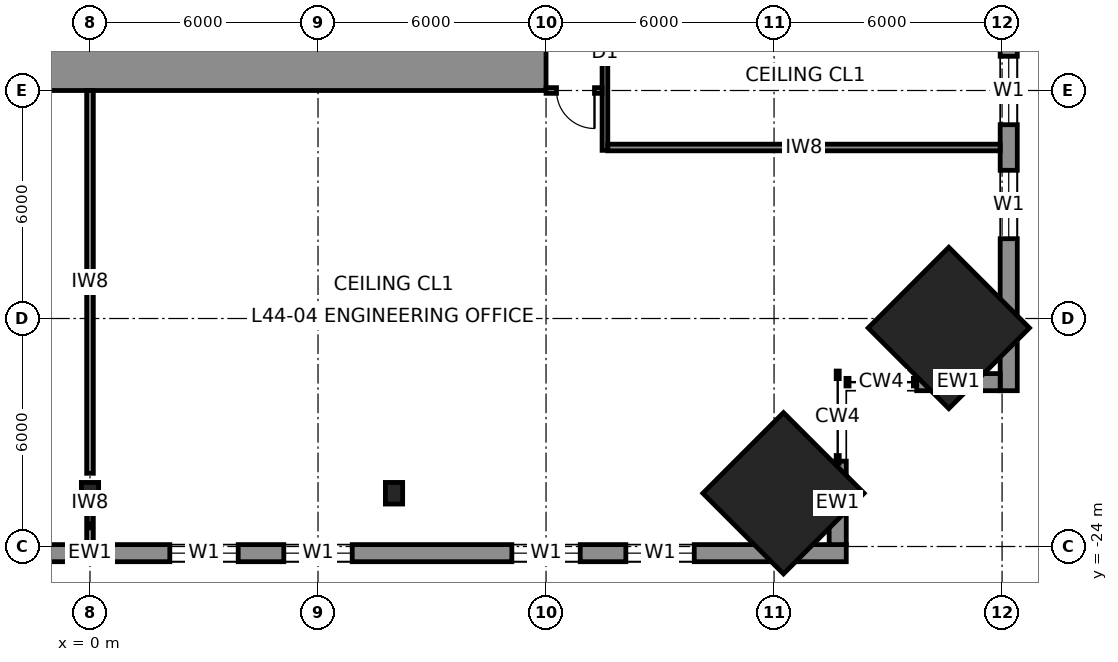
"""IFC4 building model, lengths in metres.
Left out: names, types, materials, properties, quantities, classifications, styles, units other than length and angle.
Written with IfcOpenShell. Run it as: python <this file> out.ifc"""

import sys

from ifc_helpers import new_model, si_unit, direction, frame, frame_2d, origin, origin_2d, place, context, subcontext, project, spatial, rectangle, i_section, extrude, element, fill, save


model = new_model("IFC4")
c1 = context("Model", 3, precision=1e-05, world=origin(), true_north=direction((0.0, 1.0)))
c2 = subcontext(c1, "Body", "Model", "MODEL_VIEW")
j1 = project(units=[si_unit("LENGTHUNIT", "METRE"), si_unit("PLANEANGLEUNIT", "RADIAN")], contexts=[c1])
p1 = place(None, origin())
s1 = spatial("IfcSite", under=j1, at=p1, CompositionType="ELEMENT")
p2 = place(p1, origin())
s2 = spatial("IfcBuilding", under=s1, at=p2, CompositionType="ELEMENT")
p3 = place(p2, frame((0.0, 0.0, 205.8)))
s3 = spatial("IfcBuildingStorey", under=s2, at=p3, CompositionType="ELEMENT", Elevation=205.8)
for number, where, z_axis, x_axis in (
    (1, (22.598, -18.248, 0.0), (-0.04, 0.04, 0.998), (-0.707, -0.708, 0.0)),
    (2, (18.248, -22.598, 0.0), (-0.04, 0.04, 0.998), (-0.708, -0.707, 0.0)),
):
    element("IfcColumn", number, at=place(p3, frame(where, z_axis=z_axis, x_axis=x_axis)), inside=s3, PredefinedType="COLUMN", context=c2, shape_type="SweptSolid", body=[
        extrude(rectangle(XDim=3.0, YDim=3.0, at=origin_2d()), origin(), (0.0, 0.0, 1.0), 4.007),
    ])
for number, where, z_axis, x_axis in (
    (3, (0.0, -22.598, 0.0), (0.0, 0.04, 0.999), (-1.0, 0.0, 0.0)),
    (4, (8.0, -22.598, 0.0), (0.0, 0.04, 0.999), (-1.0, 0.0, 0.0)),
):
    element("IfcColumn", number, at=place(p3, frame(where, z_axis=z_axis, x_axis=x_axis)), inside=s3, PredefinedType="COLUMN", context=c2, shape_type="SweptSolid", body=[
        extrude(i_section(OverallWidth=0.454, OverallDepth=0.569, WebThickness=0.078, FlangeThickness=0.125, at=origin_2d()), origin(), (0.0, 0.0, 1.0), 4.003),
    ])
p4 = place(p3, frame((12.0, -11.25, 0.0), z_axis=(0.0, 0.0, 1.0), x_axis=(-1.0, 0.0, 0.0)))
e5 = element("IfcWall", 5, at=p4, inside=s3, PredefinedType="SHEAR", context=c2, shape_type="SweptSolid", body=[
    extrude(rectangle(XDim=24.0, YDim=1.5, at=frame_2d((12.0, 0.0))), origin(), (0.0, 0.0, 1.0), 4.0),
])
p5 = place(p3, frame((24.175, -19.9, 0.0), z_axis=(0.0, 0.0, 1.0), x_axis=(0.0, 1.0, 0.0)))
e6 = element("IfcWall", 6, at=p5, inside=s3, PredefinedType="SOLIDWALL", context=c2, shape_type="SweptSolid", body=[
    extrude(rectangle(XDim=39.8, YDim=0.45, at=frame_2d((19.9, 0.0))), origin(), (0.0, 0.0, 1.0), 3.83),
])
p6 = place(p5, frame((4.0, 0.0, 0.7)))
e7 = element("IfcOpeningElement", 7, at=p6, cuts=e6, PredefinedType="OPENING", context=c2, shape_type="SweptSolid", body=[
    extrude(rectangle(XDim=1.8, YDim=2.6, at=frame_2d((0.9, 1.3))), frame((0.0, 0.235, 0.0), z_axis=(0.0, -1.0, 0.0), x_axis=(1.0, 0.0, 0.0)), (0.0, 0.0, 1.0), 0.47),
])
p7 = place(p5, frame((7.0, 0.0, 0.7)))
e8 = element("IfcOpeningElement", 8, at=p7, cuts=e6, PredefinedType="OPENING", context=c2, shape_type="SweptSolid", body=[
    extrude(rectangle(XDim=1.8, YDim=2.6, at=frame_2d((0.9, 1.3))), frame((0.0, 0.235, 0.0), z_axis=(0.0, -1.0, 0.0), x_axis=(1.0, 0.0, 0.0)), (0.0, 0.0, 1.0), 0.47),
])
p8 = place(p5, frame((13.0, 0.0, 0.7)))
e9 = element("IfcOpeningElement", 9, at=p8, cuts=e6, PredefinedType="OPENING", context=c2, shape_type="SweptSolid", body=[
    extrude(rectangle(XDim=1.8, YDim=2.6, at=frame_2d((0.9, 1.3))), frame((0.0, 0.235, 0.0), z_axis=(0.0, -1.0, 0.0), x_axis=(1.0, 0.0, 0.0)), (0.0, 0.0, 1.0), 0.47),
])
p9 = place(p5, frame((16.0, 0.0, 0.7)))
e10 = element("IfcOpeningElement", 10, at=p9, cuts=e6, PredefinedType="OPENING", context=c2, shape_type="SweptSolid", body=[
    extrude(rectangle(XDim=1.8, YDim=2.6, at=frame_2d((0.9, 1.3))), frame((0.0, 0.235, 0.0), z_axis=(0.0, -1.0, 0.0), x_axis=(1.0, 0.0, 0.0)), (0.0, 0.0, 1.0), 0.47),
])
p10 = place(p5, frame((22.0, 0.0, 0.7)))
e11 = element("IfcOpeningElement", 11, at=p10, cuts=e6, PredefinedType="OPENING", context=c2, shape_type="SweptSolid", body=[
    extrude(rectangle(XDim=1.8, YDim=2.6, at=frame_2d((0.9, 1.3))), frame((0.0, 0.235, 0.0), z_axis=(0.0, -1.0, 0.0), x_axis=(1.0, 0.0, 0.0)), (0.0, 0.0, 1.0), 0.47),
])
p11 = place(p5, frame((25.0, 0.0, 0.7)))
e12 = element("IfcOpeningElement", 12, at=p11, cuts=e6, PredefinedType="OPENING", context=c2, shape_type="SweptSolid", body=[
    extrude(rectangle(XDim=1.8, YDim=2.6, at=frame_2d((0.9, 1.3))), frame((0.0, 0.235, 0.0), z_axis=(0.0, -1.0, 0.0), x_axis=(1.0, 0.0, 0.0)), (0.0, 0.0, 1.0), 0.47),
])
p12 = place(p5, frame((31.0, 0.0, 0.7)))
e13 = element("IfcOpeningElement", 13, at=p12, cuts=e6, PredefinedType="OPENING", context=c2, shape_type="SweptSolid", body=[
    extrude(rectangle(XDim=1.8, YDim=2.6, at=frame_2d((0.9, 1.3))), frame((0.0, 0.235, 0.0), z_axis=(0.0, -1.0, 0.0), x_axis=(1.0, 0.0, 0.0)), (0.0, 0.0, 1.0), 0.47),
])
p13 = place(p5, frame((34.0, 0.0, 0.7)))
e14 = element("IfcOpeningElement", 14, at=p13, cuts=e6, PredefinedType="OPENING", context=c2, shape_type="SweptSolid", body=[
    extrude(rectangle(XDim=1.8, YDim=2.6, at=frame_2d((0.9, 1.3))), frame((0.0, 0.235, 0.0), z_axis=(0.0, -1.0, 0.0), x_axis=(1.0, 0.0, 0.0)), (0.0, 0.0, 1.0), 0.47),
])
p14 = place(p3, frame((-19.9, -24.175, 0.0), z_axis=(0.0, 0.0, 1.0), x_axis=(1.0, 0.0, 0.0)))
e15 = element("IfcWall", 15, at=p14, inside=s3, PredefinedType="SOLIDWALL", context=c2, shape_type="SweptSolid", body=[
    extrude(rectangle(XDim=39.8, YDim=0.45, at=frame_2d((19.9, 0.0))), origin(), (0.0, 0.0, 1.0), 3.83),
])
p15 = place(p14, frame((4.0, 0.0, 0.7)))
e16 = element("IfcOpeningElement", 16, at=p15, cuts=e15, PredefinedType="OPENING", context=c2, shape_type="SweptSolid", body=[
    extrude(rectangle(XDim=1.8, YDim=2.6, at=frame_2d((0.9, 1.3))), frame((0.0, 0.235, 0.0), z_axis=(0.0, -1.0, 0.0), x_axis=(1.0, 0.0, 0.0)), (0.0, 0.0, 1.0), 0.47),
])
p16 = place(p14, frame((7.0, 0.0, 0.7)))
e17 = element("IfcOpeningElement", 17, at=p16, cuts=e15, PredefinedType="OPENING", context=c2, shape_type="SweptSolid", body=[
    extrude(rectangle(XDim=1.8, YDim=2.6, at=frame_2d((0.9, 1.3))), frame((0.0, 0.235, 0.0), z_axis=(0.0, -1.0, 0.0), x_axis=(1.0, 0.0, 0.0)), (0.0, 0.0, 1.0), 0.47),
])
p17 = place(p14, frame((13.0, 0.0, 0.7)))
e18 = element("IfcOpeningElement", 18, at=p17, cuts=e15, PredefinedType="OPENING", context=c2, shape_type="SweptSolid", body=[
    extrude(rectangle(XDim=1.8, YDim=2.6, at=frame_2d((0.9, 1.3))), frame((0.0, 0.235, 0.0), z_axis=(0.0, -1.0, 0.0), x_axis=(1.0, 0.0, 0.0)), (0.0, 0.0, 1.0), 0.47),
])
p18 = place(p14, frame((16.0, 0.0, 0.7)))
e19 = element("IfcOpeningElement", 19, at=p18, cuts=e15, PredefinedType="OPENING", context=c2, shape_type="SweptSolid", body=[
    extrude(rectangle(XDim=1.8, YDim=2.6, at=frame_2d((0.9, 1.3))), frame((0.0, 0.235, 0.0), z_axis=(0.0, -1.0, 0.0), x_axis=(1.0, 0.0, 0.0)), (0.0, 0.0, 1.0), 0.47),
])
p19 = place(p14, frame((22.0, 0.0, 0.7)))
e20 = element("IfcOpeningElement", 20, at=p19, cuts=e15, PredefinedType="OPENING", context=c2, shape_type="SweptSolid", body=[
    extrude(rectangle(XDim=1.8, YDim=2.6, at=frame_2d((0.9, 1.3))), frame((0.0, 0.235, 0.0), z_axis=(0.0, -1.0, 0.0), x_axis=(1.0, 0.0, 0.0)), (0.0, 0.0, 1.0), 0.47),
])
p20 = place(p14, frame((25.0, 0.0, 0.7)))
e21 = element("IfcOpeningElement", 21, at=p20, cuts=e15, PredefinedType="OPENING", context=c2, shape_type="SweptSolid", body=[
    extrude(rectangle(XDim=1.8, YDim=2.6, at=frame_2d((0.9, 1.3))), frame((0.0, 0.235, 0.0), z_axis=(0.0, -1.0, 0.0), x_axis=(1.0, 0.0, 0.0)), (0.0, 0.0, 1.0), 0.47),
])
p21 = place(p14, frame((31.0, 0.0, 0.7)))
e22 = element("IfcOpeningElement", 22, at=p21, cuts=e15, PredefinedType="OPENING", context=c2, shape_type="SweptSolid", body=[
    extrude(rectangle(XDim=1.8, YDim=2.6, at=frame_2d((0.9, 1.3))), frame((0.0, 0.235, 0.0), z_axis=(0.0, -1.0, 0.0), x_axis=(1.0, 0.0, 0.0)), (0.0, 0.0, 1.0), 0.47),
])
p22 = place(p14, frame((34.0, 0.0, 0.7)))
e23 = element("IfcOpeningElement", 23, at=p22, cuts=e15, PredefinedType="OPENING", context=c2, shape_type="SweptSolid", body=[
    extrude(rectangle(XDim=1.8, YDim=2.6, at=frame_2d((0.9, 1.3))), frame((0.0, 0.235, 0.0), z_axis=(0.0, -1.0, 0.0), x_axis=(1.0, 0.0, 0.0)), (0.0, 0.0, 1.0), 0.47),
])
for number, where, z_axis, x_axis in (
    (24, (19.675, -21.754, 0.0), (0.0, 0.0, 1.0), (0.0, -1.0, 0.0)),
    (25, (21.754, -19.675, 0.0), (0.0, 0.0, 1.0), (1.0, 0.0, 0.0)),
):
    element("IfcWall", number, at=place(p3, frame(where, z_axis=z_axis, x_axis=x_axis)), inside=s3, PredefinedType="SOLIDWALL", context=c2, shape_type="SweptSolid", body=[
        extrude(rectangle(XDim=2.196, YDim=0.45, at=frame_2d((1.098, 0.0))), origin(), (0.0, 0.0, 1.0), 3.83),
    ])
p23 = place(p3, frame((13.55, -13.575, 0.0), z_axis=(0.0, 0.0, 1.0), x_axis=(0.0, 1.0, 0.0)))
e26 = element("IfcWall", 26, at=p23, inside=s3, PredefinedType="PARTITIONING", context=c2, shape_type="SweptSolid", body=[
    extrude(rectangle(XDim=27.15, YDim=0.15, at=frame_2d((13.575, 0.0))), origin(), (0.0, 0.0, 1.0), 3.83),
])
p24 = place(p23, frame((3.175, 0.0, 0.0)))
e27 = element("IfcOpeningElement", 27, at=p24, cuts=e26, PredefinedType="OPENING", context=c2, shape_type="SweptSolid", body=[
    extrude(rectangle(XDim=1.0, YDim=2.3, at=frame_2d((0.5, 1.15))), frame((0.0, 0.085, 0.0), z_axis=(0.0, -1.0, 0.0), x_axis=(1.0, 0.0, 0.0)), (0.0, 0.0, 1.0), 0.17),
])
p25 = place(p23, frame((13.325, 0.0, 0.0)))
e28 = element("IfcOpeningElement", 28, at=p25, cuts=e26, PredefinedType="OPENING", context=c2, shape_type="SweptSolid", body=[
    extrude(rectangle(XDim=1.0, YDim=2.3, at=frame_2d((0.5, 1.15))), frame((0.0, 0.085, 0.0), z_axis=(0.0, -1.0, 0.0), x_axis=(1.0, 0.0, 0.0)), (0.0, 0.0, 1.0), 0.17),
])
p26 = place(p23, frame((22.975, 0.0, 0.0)))
e29 = element("IfcOpeningElement", 29, at=p26, cuts=e26, PredefinedType="OPENING", context=c2, shape_type="SweptSolid", body=[
    extrude(rectangle(XDim=1.0, YDim=2.3, at=frame_2d((0.5, 1.15))), frame((0.0, 0.085, 0.0), z_axis=(0.0, -1.0, 0.0), x_axis=(1.0, 0.0, 0.0)), (0.0, 0.0, 1.0), 0.17),
])
p27 = place(p23, frame((9.325, 0.0, 0.0)))
e30 = element("IfcOpeningElement", 30, at=p27, cuts=e26, PredefinedType="OPENING", context=c2, shape_type="SweptSolid", body=[
    extrude(rectangle(XDim=1.0, YDim=2.3, at=frame_2d((0.5, 1.15))), frame((0.0, 0.085, 0.0), z_axis=(0.0, -1.0, 0.0), x_axis=(1.0, 0.0, 0.0)), (0.0, 0.0, 1.0), 0.17),
])
p28 = place(p23, frame((16.825, 0.0, 0.0)))
e31 = element("IfcOpeningElement", 31, at=p28, cuts=e26, PredefinedType="OPENING", context=c2, shape_type="SweptSolid", body=[
    extrude(rectangle(XDim=1.0, YDim=2.3, at=frame_2d((0.5, 1.15))), frame((0.0, 0.085, 0.0), z_axis=(0.0, -1.0, 0.0), x_axis=(1.0, 0.0, 0.0)), (0.0, 0.0, 1.0), 0.17),
])
p29 = place(p3, frame((13.475, -12.0, 0.0), z_axis=(0.0, 0.0, 1.0), x_axis=(-1.0, 0.0, 0.0)))
e32 = element("IfcWall", 32, at=p29, inside=s3, PredefinedType="PARTITIONING", context=c2, shape_type="SweptSolid", body=[
    extrude(rectangle(XDim=1.475, YDim=0.15, at=frame_2d((0.738, 0.0))), origin(), (0.0, 0.0, 1.0), 3.83),
])
p30 = place(p29, frame((0.2, 0.0, 0.0)))
e33 = element("IfcOpeningElement", 33, at=p30, cuts=e32, PredefinedType="OPENING", context=c2, shape_type="SweptSolid", body=[
    extrude(rectangle(XDim=1.0, YDim=2.3, at=frame_2d((0.5, 1.15))), frame((0.0, 0.085, 0.0), z_axis=(0.0, -1.0, 0.0), x_axis=(1.0, 0.0, 0.0)), (0.0, 0.0, 1.0), 0.17),
])
p31 = place(p3, frame((23.95, -13.5, 0.0), z_axis=(0.0, 0.0, 1.0), x_axis=(-1.0, 0.0, 0.0)))
e34 = element("IfcWall", 34, at=p31, inside=s3, PredefinedType="PARTITIONING", context=c2, shape_type="SweptSolid", body=[
    extrude(rectangle(XDim=10.325, YDim=0.175, at=frame_2d((5.163, 0.0))), origin(), (0.0, 0.0, 1.0), 3.83),
])
p32 = place(p3, frame((0.0, -12.0, 0.0), z_axis=(0.0, 0.0, 1.0), x_axis=(0.0, -1.0, 0.0)))
e35 = element("IfcWall", 35, at=p32, inside=s3, PredefinedType="PARTITIONING", context=c2, shape_type="SweptSolid", body=[
    extrude(rectangle(XDim=10.073, YDim=0.175, at=frame_2d((5.037, 0.0))), origin(), (0.0, 0.0, 1.0), 3.04),
])
p33 = place(p3, frame((0.0, -22.962, 0.0), z_axis=(0.0, 0.0, 1.0), x_axis=(0.0, -1.0, 0.0)))
e36 = element("IfcWall", 36, at=p33, inside=s3, PredefinedType="PARTITIONING", context=c2, shape_type="SweptSolid", body=[
    extrude(rectangle(XDim=0.988, YDim=0.175, at=frame_2d((0.494, 0.0))), origin(), (0.0, 0.0, 1.0), 3.83),
])
p34 = place(p6, origin())
e37 = element("IfcWindow", 37, at=p34, inside=s3, PartitioningType="SINGLE_PANEL", PredefinedType="WINDOW", context=c2, shape_type="SweptSolid", body=[
    extrude(rectangle(XDim=1.8, YDim=2.6, at=frame_2d((0.9, 1.3))), frame((0.0, 0.03, 0.0), z_axis=(0.0, -1.0, 0.0), x_axis=(1.0, 0.0, 0.0)), (0.0, 0.0, 1.0), 0.06),
])
fill(e7, e37)
p35 = place(p7, origin())
e38 = element("IfcWindow", 38, at=p35, inside=s3, PartitioningType="SINGLE_PANEL", PredefinedType="WINDOW", context=c2, shape_type="SweptSolid", body=[
    extrude(rectangle(XDim=1.8, YDim=2.6, at=frame_2d((0.9, 1.3))), frame((0.0, 0.03, 0.0), z_axis=(0.0, -1.0, 0.0), x_axis=(1.0, 0.0, 0.0)), (0.0, 0.0, 1.0), 0.06),
])
fill(e8, e38)
p36 = place(p19, origin())
e39 = element("IfcWindow", 39, at=p36, inside=s3, PartitioningType="SINGLE_PANEL", PredefinedType="WINDOW", context=c2, shape_type="SweptSolid", body=[
    extrude(rectangle(XDim=1.8, YDim=2.6, at=frame_2d((0.9, 1.3))), frame((0.0, 0.03, 0.0), z_axis=(0.0, -1.0, 0.0), x_axis=(1.0, 0.0, 0.0)), (0.0, 0.0, 1.0), 0.06),
])
fill(e20, e39)
p37 = place(p20, origin())
e40 = element("IfcWindow", 40, at=p37, inside=s3, PartitioningType="SINGLE_PANEL", PredefinedType="WINDOW", context=c2, shape_type="SweptSolid", body=[
    extrude(rectangle(XDim=1.8, YDim=2.6, at=frame_2d((0.9, 1.3))), frame((0.0, 0.03, 0.0), z_axis=(0.0, -1.0, 0.0), x_axis=(1.0, 0.0, 0.0)), (0.0, 0.0, 1.0), 0.06),
])
fill(e21, e40)
p38 = place(p21, origin())
e41 = element("IfcWindow", 41, at=p38, inside=s3, PartitioningType="SINGLE_PANEL", PredefinedType="WINDOW", context=c2, shape_type="SweptSolid", body=[
    extrude(rectangle(XDim=1.8, YDim=2.6, at=frame_2d((0.9, 1.3))), frame((0.0, 0.03, 0.0), z_axis=(0.0, -1.0, 0.0), x_axis=(1.0, 0.0, 0.0)), (0.0, 0.0, 1.0), 0.06),
])
fill(e22, e41)
p39 = place(p22, origin())
e42 = element("IfcWindow", 42, at=p39, inside=s3, PartitioningType="SINGLE_PANEL", PredefinedType="WINDOW", context=c2, shape_type="SweptSolid", body=[
    extrude(rectangle(XDim=1.8, YDim=2.6, at=frame_2d((0.9, 1.3))), frame((0.0, 0.03, 0.0), z_axis=(0.0, -1.0, 0.0), x_axis=(1.0, 0.0, 0.0)), (0.0, 0.0, 1.0), 0.06),
])
fill(e23, e42)
p40 = place(p30, origin())
e43 = element("IfcDoor", 43, at=p40, inside=s3, OperationType="SINGLE_SWING_LEFT", PredefinedType="DOOR", context=c2, shape_type="SweptSolid", body=[
    extrude(rectangle(XDim=1.0, YDim=2.3, at=frame_2d((0.5, 1.15))), frame((0.0, 0.025, 0.0), z_axis=(0.0, -1.0, 0.0), x_axis=(1.0, 0.0, 0.0)), (0.0, 0.0, 1.0), 0.05),
])
fill(e33, e43)
save(model, sys.argv[1])
